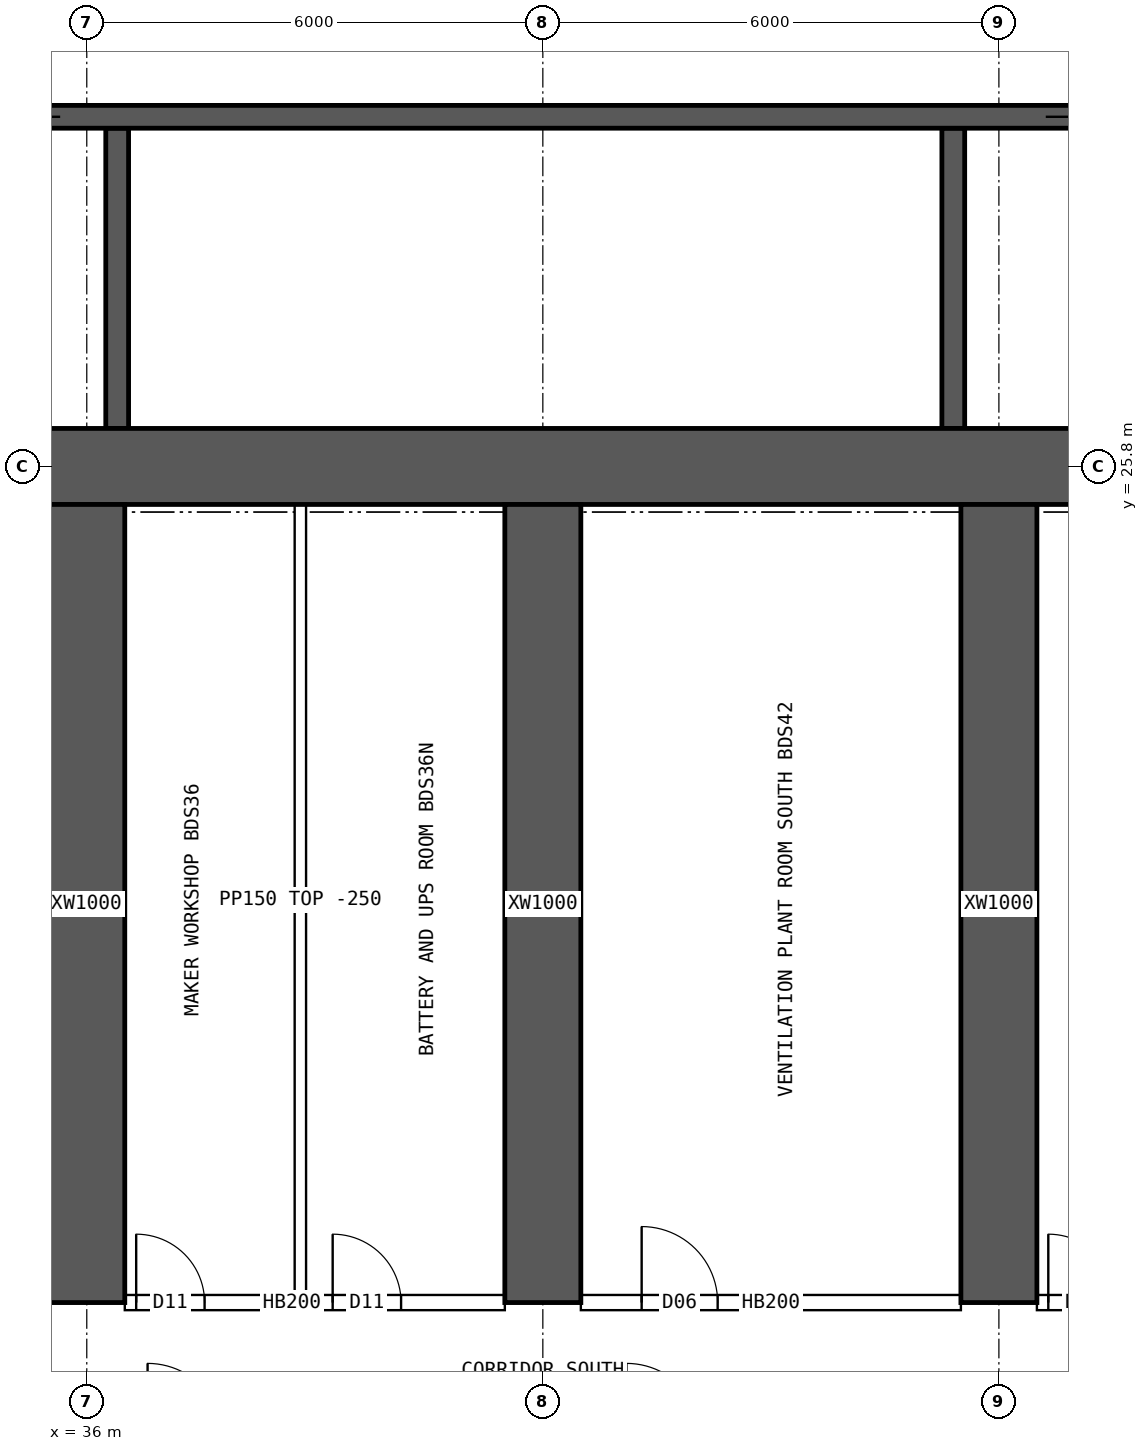
"""IFC4 building model, lengths in metres.
Left out: names, types, materials, properties, quantities, classifications, styles, units other than length and angle.
Written with IfcOpenShell. Run it as: python <this file> out.ifc"""

import sys

from ifc_helpers import new_model, si_unit, direction, frame, frame_2d, origin, place, context, subcontext, project, spatial, rectangle, extrude, element, fill, save


model = new_model("IFC4")
c1 = context("Model", 3, precision=1e-05, world=origin(), true_north=direction((0.0, 1.0)))
c2 = subcontext(c1, "Body", "Model", "MODEL_VIEW")
j1 = project(units=[si_unit("LENGTHUNIT", "METRE"), si_unit("PLANEANGLEUNIT", "RADIAN")], contexts=[c1])
p1 = place(None, origin())
s1 = spatial("IfcSite", under=j1, at=p1, CompositionType="ELEMENT")
p2 = place(p1, origin())
s2 = spatial("IfcBuilding", under=s1, at=p2, CompositionType="ELEMENT")
p3 = place(p2, frame((0.0, 0.0, 38.95)))
s3 = spatial("IfcBuildingStorey", under=s2, at=p3, CompositionType="ELEMENT", Elevation=38.95)
p4 = place(p3, frame((18.0, 25.8, 0.0), z_axis=(0.0, 0.0, 1.0), x_axis=(1.0, 0.0, 0.0)))
e1 = element("IfcWall", 1, at=p4, inside=s3, PredefinedType="SHEAR", context=c2, shape_type="SweptSolid", body=[
    extrude(rectangle(XDim=48.0, YDim=1.0, at=frame_2d((24.0, 0.0))), origin(), (0.0, 0.0, 1.0), 3.75),
])
p5 = place(p3, frame((18.5, 30.4, 0.0), z_axis=(0.0, 0.0, 1.0), x_axis=(1.0, 0.0, 0.0)))
e2 = element("IfcWall", 2, at=p5, inside=s3, PredefinedType="SHEAR", context=c2, shape_type="SweptSolid", body=[
    extrude(rectangle(XDim=47.0, YDim=0.3, at=frame_2d((23.5, 0.0))), origin(), (0.0, 0.0, 1.0), 3.75),
])
p6 = place(p5, frame((0.4, 0.0, 0.0)))
e3 = element("IfcOpeningElement", 3, at=p6, cuts=e2, PredefinedType="OPENING", context=c2, shape_type="SweptSolid", body=[
    extrude(rectangle(XDim=1.0, YDim=2.1, at=frame_2d((0.5, 1.05))), frame((0.0, 0.16, 0.0), z_axis=(0.0, -1.0, 0.0), x_axis=(1.0, 0.0, 0.0)), (0.0, 0.0, 1.0), 0.32),
])
p7 = place(p5, frame((45.6, 0.0, 0.0)))
e4 = element("IfcOpeningElement", 4, at=p7, cuts=e2, PredefinedType="OPENING", context=c2, shape_type="SweptSolid", body=[
    extrude(rectangle(XDim=1.0, YDim=2.1, at=frame_2d((0.5, 1.05))), frame((0.0, 0.16, 0.0), z_axis=(0.0, -1.0, 0.0), x_axis=(1.0, 0.0, 0.0)), (0.0, 0.0, 1.0), 0.32),
])
p8 = place(p5, frame((8.25, 0.0, 0.0)))
e5 = element("IfcOpeningElement", 5, at=p8, cuts=e2, PredefinedType="OPENING", context=c2, shape_type="SweptSolid", body=[
    extrude(rectangle(XDim=1.1, YDim=2.1, at=frame_2d((0.55, 1.05))), frame((0.0, 0.16, 0.0), z_axis=(0.0, -1.0, 0.0), x_axis=(1.0, 0.0, 0.0)), (0.0, 0.0, 1.0), 0.32),
])
p9 = place(p5, frame((10.85, 0.0, 0.0)))
e6 = element("IfcOpeningElement", 6, at=p9, cuts=e2, PredefinedType="OPENING", context=c2, shape_type="SweptSolid", body=[
    extrude(rectangle(XDim=1.1, YDim=2.1, at=frame_2d((0.55, 1.05))), frame((0.0, 0.16, 0.0), z_axis=(0.0, -1.0, 0.0), x_axis=(1.0, 0.0, 0.0)), (0.0, 0.0, 1.0), 0.32),
])
p10 = place(p5, frame((13.45, 0.0, 0.0)))
e7 = element("IfcOpeningElement", 7, at=p10, cuts=e2, PredefinedType="OPENING", context=c2, shape_type="SweptSolid", body=[
    extrude(rectangle(XDim=1.1, YDim=2.1, at=frame_2d((0.55, 1.05))), frame((0.0, 0.16, 0.0), z_axis=(0.0, -1.0, 0.0), x_axis=(1.0, 0.0, 0.0)), (0.0, 0.0, 1.0), 0.32),
])
p11 = place(p5, frame((16.05, 0.0, 0.0)))
e8 = element("IfcOpeningElement", 8, at=p11, cuts=e2, PredefinedType="OPENING", context=c2, shape_type="SweptSolid", body=[
    extrude(rectangle(XDim=1.1, YDim=2.1, at=frame_2d((0.55, 1.05))), frame((0.0, 0.16, 0.0), z_axis=(0.0, -1.0, 0.0), x_axis=(1.0, 0.0, 0.0)), (0.0, 0.0, 1.0), 0.32),
])
p12 = place(p5, frame((30.117, 0.0, 0.0)))
e9 = element("IfcOpeningElement", 9, at=p12, cuts=e2, PredefinedType="OPENING", context=c2, shape_type="SweptSolid", body=[
    extrude(rectangle(XDim=1.1, YDim=2.1, at=frame_2d((0.55, 1.05))), frame((0.0, 0.16, 0.0), z_axis=(0.0, -1.0, 0.0), x_axis=(1.0, 0.0, 0.0)), (0.0, 0.0, 1.0), 0.32),
])
p13 = place(p5, frame((33.65, 0.0, 0.0)))
e10 = element("IfcOpeningElement", 10, at=p13, cuts=e2, PredefinedType="OPENING", context=c2, shape_type="SweptSolid", body=[
    extrude(rectangle(XDim=1.1, YDim=2.1, at=frame_2d((0.55, 1.05))), frame((0.0, 0.16, 0.0), z_axis=(0.0, -1.0, 0.0), x_axis=(1.0, 0.0, 0.0)), (0.0, 0.0, 1.0), 0.32),
])
p14 = place(p5, frame((37.183, 0.0, 0.0)))
e11 = element("IfcOpeningElement", 11, at=p14, cuts=e2, PredefinedType="OPENING", context=c2, shape_type="SweptSolid", body=[
    extrude(rectangle(XDim=1.1, YDim=2.1, at=frame_2d((0.55, 1.05))), frame((0.0, 0.16, 0.0), z_axis=(0.0, -1.0, 0.0), x_axis=(1.0, 0.0, 0.0)), (0.0, 0.0, 1.0), 0.32),
])
for number, where, z_axis, x_axis in (
    (12, (36.4, 26.3, 0.0), (0.0, 0.0, 1.0), (0.0, 1.0, 0.0)),
    (13, (47.4, 26.3, 0.0), (0.0, 0.0, 1.0), (0.0, 1.0, 0.0)),
):
    element("IfcWall", number, at=place(p3, frame(where, z_axis=z_axis, x_axis=x_axis)), inside=s3, PredefinedType="SHEAR", context=c2, shape_type="SweptSolid", body=[
        extrude(rectangle(XDim=3.95, YDim=0.3, at=frame_2d((1.975, 0.0))), origin(), (0.0, 0.0, 1.0), 3.75),
    ])
for number, where, z_axis, x_axis in (
    (14, (36.0, 14.8, 0.0), (0.0, 0.0, 1.0), (0.0, 1.0, 0.0)),
    (15, (42.0, 14.8, 0.0), (0.0, 0.0, 1.0), (0.0, 1.0, 0.0)),
    (16, (48.0, 14.8, 0.0), (0.0, 0.0, 1.0), (0.0, 1.0, 0.0)),
):
    element("IfcWall", number, at=place(p3, frame(where, z_axis=z_axis, x_axis=x_axis)), inside=s3, PredefinedType="SHEAR", context=c2, shape_type="SweptSolid", body=[
        extrude(rectangle(XDim=10.5, YDim=1.0, at=frame_2d((5.25, 0.0))), origin(), (0.0, 0.0, 1.0), 3.75),
    ])
p15 = place(p3, frame((36.5, 14.8, 0.0), z_axis=(0.0, 0.0, 1.0), x_axis=(1.0, 0.0, 0.0)))
e17 = element("IfcWall", 17, at=p15, inside=s3, PredefinedType="SOLIDWALL", context=c2, shape_type="SweptSolid", body=[
    extrude(rectangle(XDim=5.0, YDim=0.2, at=frame_2d((2.5, 0.0))), origin(), (0.0, 0.0, 1.0), 3.5),
])
p16 = place(p15, frame((0.15, 0.0, 0.0)))
e18 = element("IfcOpeningElement", 18, at=p16, cuts=e17, PredefinedType="OPENING", context=c2, shape_type="SweptSolid", body=[
    extrude(rectangle(XDim=0.9, YDim=2.1, at=frame_2d((0.45, 1.05))), frame((0.0, 0.11, 0.0), z_axis=(0.0, -1.0, 0.0), x_axis=(1.0, 0.0, 0.0)), (0.0, 0.0, 1.0), 0.22),
])
p17 = place(p15, frame((2.735, 0.0, 0.0)))
e19 = element("IfcOpeningElement", 19, at=p17, cuts=e17, PredefinedType="OPENING", context=c2, shape_type="SweptSolid", body=[
    extrude(rectangle(XDim=0.9, YDim=2.1, at=frame_2d((0.45, 1.05))), frame((0.0, 0.11, 0.0), z_axis=(0.0, -1.0, 0.0), x_axis=(1.0, 0.0, 0.0)), (0.0, 0.0, 1.0), 0.22),
])
p18 = place(p3, frame((42.5, 14.8, 0.0), z_axis=(0.0, 0.0, 1.0), x_axis=(1.0, 0.0, 0.0)))
e20 = element("IfcWall", 20, at=p18, inside=s3, PredefinedType="SOLIDWALL", context=c2, shape_type="SweptSolid", body=[
    extrude(rectangle(XDim=5.0, YDim=0.2, at=frame_2d((2.5, 0.0))), origin(), (0.0, 0.0, 1.0), 3.5),
])
p19 = place(p18, frame((0.8, 0.0, 0.0)))
e21 = element("IfcOpeningElement", 21, at=p19, cuts=e20, PredefinedType="OPENING", context=c2, shape_type="SweptSolid", body=[
    extrude(rectangle(XDim=1.0, YDim=2.1, at=frame_2d((0.5, 1.05))), frame((0.0, 0.11, 0.0), z_axis=(0.0, -1.0, 0.0), x_axis=(1.0, 0.0, 0.0)), (0.0, 0.0, 1.0), 0.22),
])
p20 = place(p3, frame((48.5, 14.8, 0.0), z_axis=(0.0, 0.0, 1.0), x_axis=(1.0, 0.0, 0.0)))
e22 = element("IfcWall", 22, at=p20, inside=s3, PredefinedType="SOLIDWALL", context=c2, shape_type="SweptSolid", body=[
    extrude(rectangle(XDim=5.0, YDim=0.2, at=frame_2d((2.5, 0.0))), origin(), (0.0, 0.0, 1.0), 3.5),
])
p21 = place(p20, frame((0.15, 0.0, 0.0)))
e23 = element("IfcOpeningElement", 23, at=p21, cuts=e22, PredefinedType="OPENING", context=c2, shape_type="SweptSolid", body=[
    extrude(rectangle(XDim=0.9, YDim=2.1, at=frame_2d((0.45, 1.05))), frame((0.0, 0.11, 0.0), z_axis=(0.0, -1.0, 0.0), x_axis=(1.0, 0.0, 0.0)), (0.0, 0.0, 1.0), 0.22),
])
p22 = place(p20, frame((3.405, 0.0, 0.0)))
e24 = element("IfcOpeningElement", 24, at=p22, cuts=e22, PredefinedType="OPENING", context=c2, shape_type="SweptSolid", body=[
    extrude(rectangle(XDim=0.9, YDim=2.1, at=frame_2d((0.45, 1.05))), frame((0.0, 0.11, 0.0), z_axis=(0.0, -1.0, 0.0), x_axis=(1.0, 0.0, 0.0)), (0.0, 0.0, 1.0), 0.22),
])
p23 = place(p3, frame((38.81, 14.9, 0.0), z_axis=(0.0, 0.0, 1.0), x_axis=(0.0, 1.0, 0.0)))
e25 = element("IfcWall", 25, at=p23, inside=s3, PredefinedType="PARTITIONING", context=c2, shape_type="SweptSolid", body=[
    extrude(rectangle(XDim=10.4, YDim=0.15, at=frame_2d((5.2, 0.0))), origin(), (0.0, 0.0, 1.0), 3.5),
])
p24 = place(p11, origin())
e26 = element("IfcDoor", 26, at=p24, inside=s3, OperationType="DOUBLE_DOOR_SLIDING", PredefinedType="DOOR", context=c2, shape_type="SweptSolid", body=[
    extrude(rectangle(XDim=1.1, YDim=2.1, at=frame_2d((0.55, 1.05))), frame((0.0, 0.025, 0.0), z_axis=(0.0, -1.0, 0.0), x_axis=(1.0, 0.0, 0.0)), (0.0, 0.0, 1.0), 0.05),
])
fill(e8, e26)
p25 = place(p12, origin())
e27 = element("IfcDoor", 27, at=p25, inside=s3, OperationType="DOUBLE_DOOR_SLIDING", PredefinedType="DOOR", context=c2, shape_type="SweptSolid", body=[
    extrude(rectangle(XDim=1.1, YDim=2.1, at=frame_2d((0.55, 1.05))), frame((0.0, 0.025, 0.0), z_axis=(0.0, -1.0, 0.0), x_axis=(1.0, 0.0, 0.0)), (0.0, 0.0, 1.0), 0.05),
])
fill(e9, e27)
p26 = place(p16, origin())
e28 = element("IfcDoor", 28, at=p26, inside=s3, OperationType="SINGLE_SWING_LEFT", PredefinedType="DOOR", context=c2, shape_type="SweptSolid", body=[
    extrude(rectangle(XDim=0.9, YDim=2.1, at=frame_2d((0.45, 1.05))), frame((0.0, 0.025, 0.0), z_axis=(0.0, -1.0, 0.0), x_axis=(1.0, 0.0, 0.0)), (0.0, 0.0, 1.0), 0.05),
])
fill(e18, e28)
p27 = place(p17, origin())
e29 = element("IfcDoor", 29, at=p27, inside=s3, OperationType="SINGLE_SWING_LEFT", PredefinedType="DOOR", context=c2, shape_type="SweptSolid", body=[
    extrude(rectangle(XDim=0.9, YDim=2.1, at=frame_2d((0.45, 1.05))), frame((0.0, 0.025, 0.0), z_axis=(0.0, -1.0, 0.0), x_axis=(1.0, 0.0, 0.0)), (0.0, 0.0, 1.0), 0.05),
])
fill(e19, e29)
p28 = place(p19, origin())
e30 = element("IfcDoor", 30, at=p28, inside=s3, OperationType="SINGLE_SWING_LEFT", PredefinedType="DOOR", context=c2, shape_type="SweptSolid", body=[
    extrude(rectangle(XDim=1.0, YDim=2.1, at=frame_2d((0.5, 1.05))), frame((0.0, 0.025, 0.0), z_axis=(0.0, -1.0, 0.0), x_axis=(1.0, 0.0, 0.0)), (0.0, 0.0, 1.0), 0.05),
])
fill(e21, e30)
p29 = place(p21, origin())
e31 = element("IfcDoor", 31, at=p29, inside=s3, OperationType="SINGLE_SWING_LEFT", PredefinedType="DOOR", context=c2, shape_type="SweptSolid", body=[
    extrude(rectangle(XDim=0.9, YDim=2.1, at=frame_2d((0.45, 1.05))), frame((0.0, 0.025, 0.0), z_axis=(0.0, -1.0, 0.0), x_axis=(1.0, 0.0, 0.0)), (0.0, 0.0, 1.0), 0.05),
])
fill(e23, e31)
save(model, sys.argv[1])
